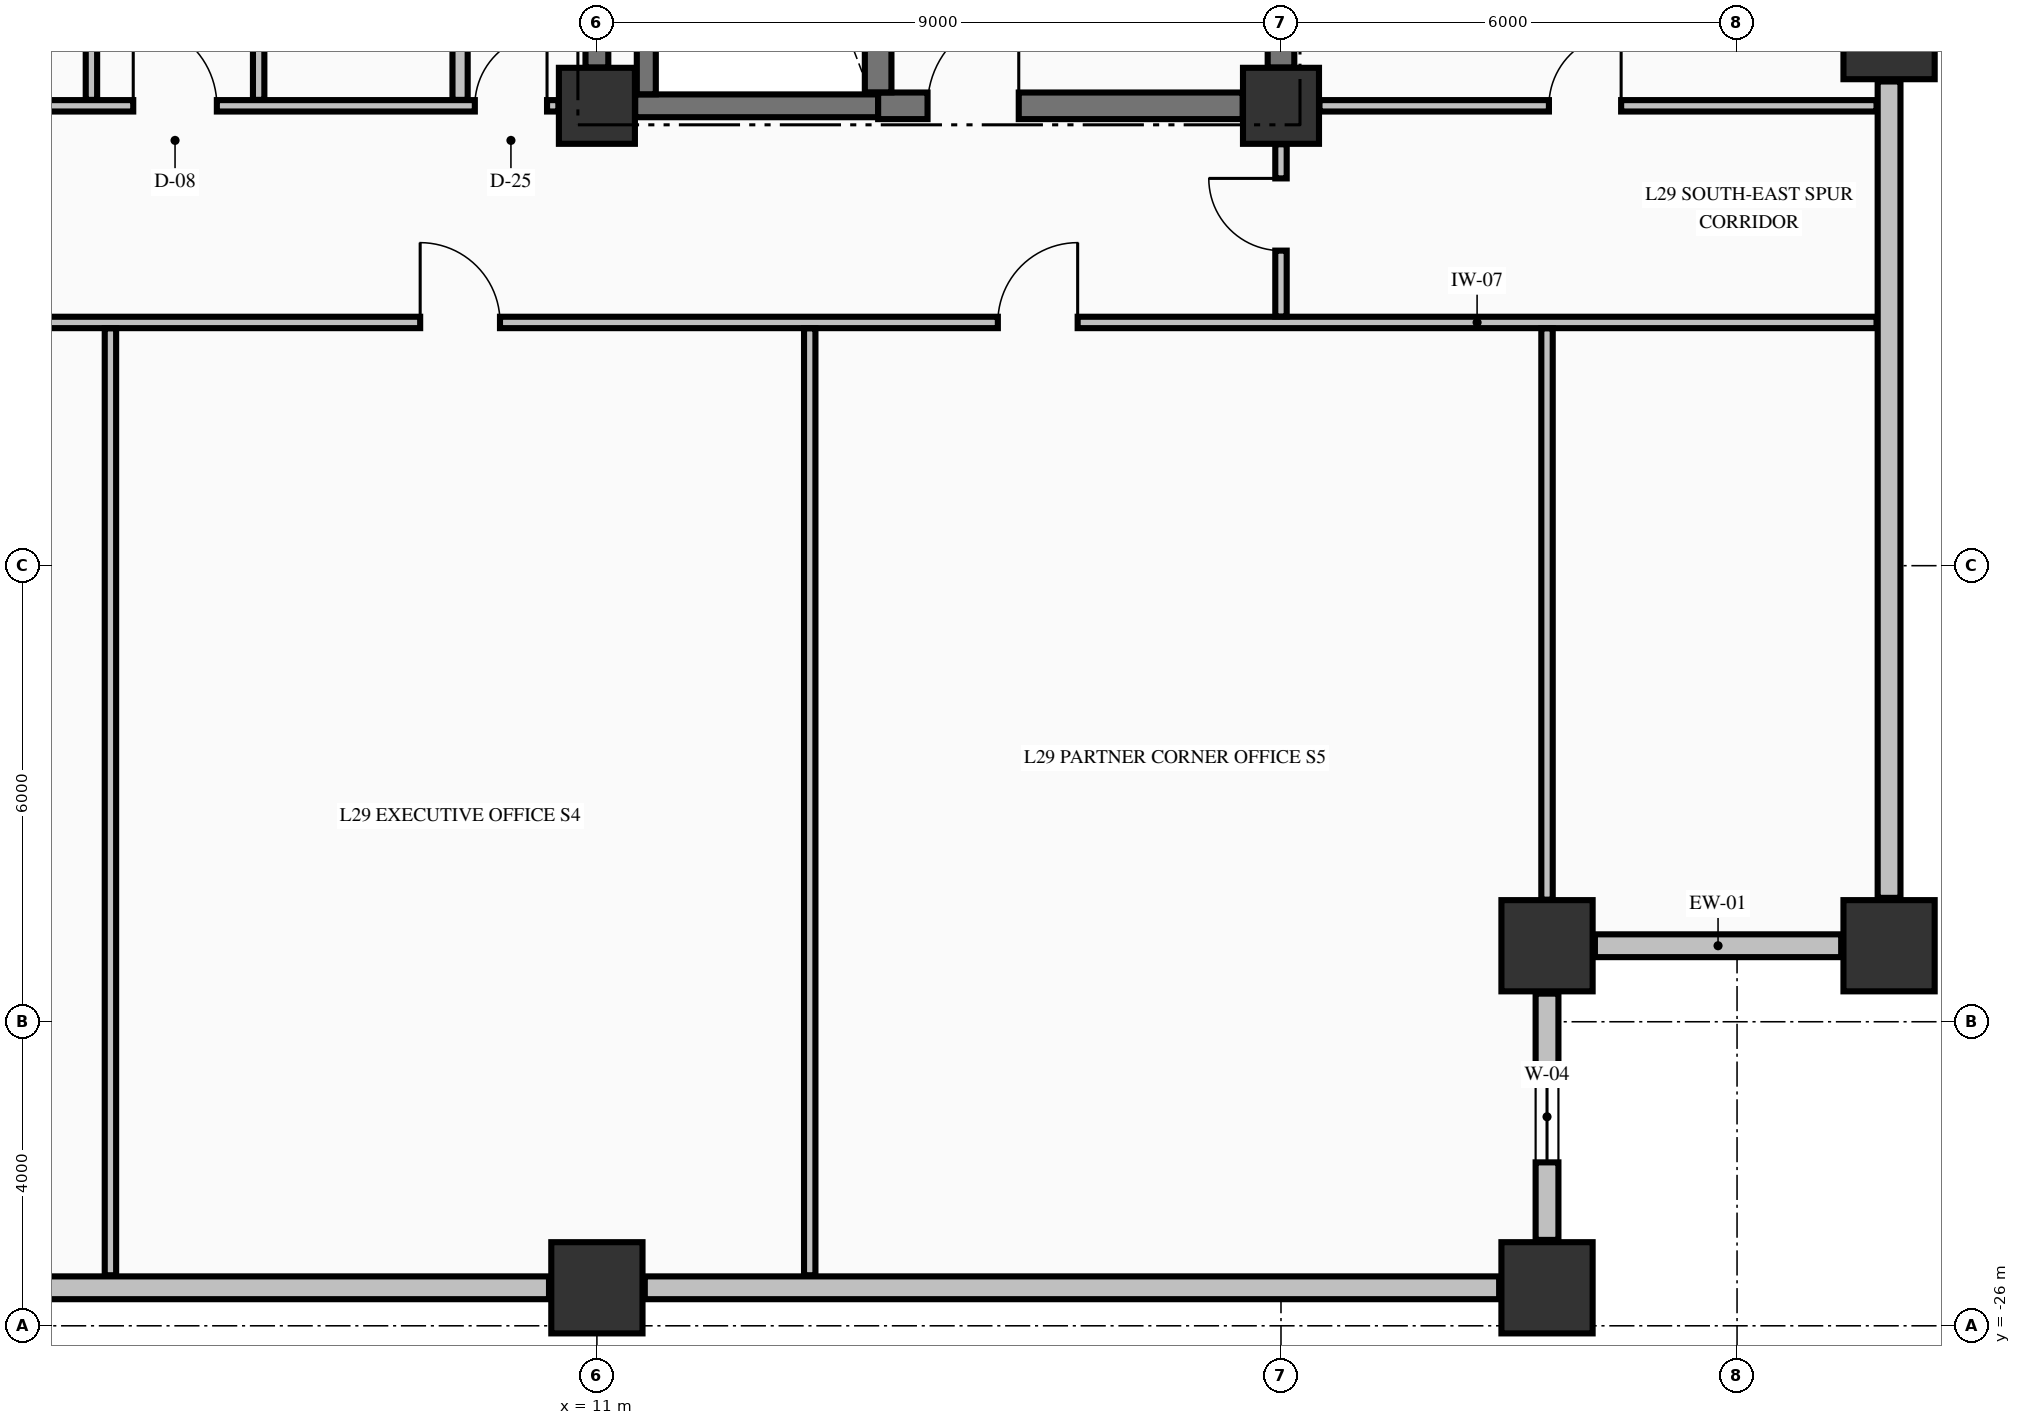
"""IFC4 building model, lengths in metres.
Left out: names, types, materials, properties, quantities, classifications, styles, units other than length and angle.
Written with IfcOpenShell. Run it as: python <this file> out.ifc"""

import sys

from ifc_helpers import new_model, si_unit, direction, frame, frame_2d, origin, origin_2d, place, context, subcontext, project, spatial, rectangle, extrude, element, fill, save


model = new_model("IFC4")
c1 = context("Model", 3, precision=1e-05, world=origin(), true_north=direction((0.0, 1.0)))
c2 = subcontext(c1, "Body", "Model", "MODEL_VIEW")
j1 = project(units=[si_unit("LENGTHUNIT", "METRE"), si_unit("PLANEANGLEUNIT", "RADIAN")], contexts=[c1])
p1 = place(None, origin())
s1 = spatial("IfcSite", under=j1, at=p1, CompositionType="ELEMENT")
p2 = place(p1, origin())
s2 = spatial("IfcBuilding", under=s1, at=p2, CompositionType="ELEMENT")
p3 = place(p2, frame((0.0, 0.0, 116.35)))
s3 = spatial("IfcBuildingStorey", under=s2, at=p3, CompositionType="ELEMENT", Elevation=116.35)
for number, where, z_axis, x_axis in (
    (1, (11.0, -25.5, -0.425), (0.0, 0.0, 1.0), (1.0, 0.0, 0.0)),
    (2, (23.5, -25.5, -0.425), (0.0, 0.0, 1.0), (1.0, 0.0, 0.0)),
    (3, (28.0, -21.0, -0.425), (0.0, 0.0, 1.0), (1.0, 0.0, 0.0)),
    (4, (28.0, -9.0, -0.425), (0.0, 0.0, 1.0), (1.0, 0.0, 0.0)),
    (5, (23.5, -21.0, -0.425), (0.0, 0.0, 1.0), (1.0, 0.0, 0.0)),
):
    element("IfcColumn", number, at=place(p3, frame(where, z_axis=z_axis, x_axis=x_axis)), inside=s3, PredefinedType="COLUMN", context=c2, shape_type="SweptSolid", body=[
        extrude(rectangle(XDim=1.2, YDim=1.2, at=origin_2d()), origin(), (0.0, 0.0, 1.0), 5.0),
    ])
for number, where, z_axis, x_axis in (
    (6, (11.0, -9.95, -0.425), (0.0, 0.0, 1.0), (1.0, 0.0, 0.0)),
    (7, (20.0, -9.95, -0.425), (0.0, 0.0, 1.0), (1.0, 0.0, 0.0)),
):
    element("IfcColumn", number, at=place(p3, frame(where, z_axis=z_axis, x_axis=x_axis)), inside=s3, PredefinedType="COLUMN", context=c2, shape_type="SweptSolid", body=[
        extrude(rectangle(XDim=1.0, YDim=1.0, at=origin_2d()), origin(), (0.0, 0.0, 1.0), 5.0),
    ])
p4 = place(p3, frame((23.5, -24.87, 0.0), z_axis=(0.0, 0.0, 1.0), x_axis=(0.0, 1.0, 0.0)))
e8 = element("IfcWall", 8, at=p4, inside=s3, PredefinedType="STANDARD", context=c2, shape_type="SweptSolid", body=[
    extrude(rectangle(XDim=3.24, YDim=0.3, at=frame_2d((1.62, 0.0))), origin(), (0.0, 0.0, 1.0), 2.767),
])
p5 = place(p4, frame((1.02, 0.0, 0.82)))
e9 = element("IfcOpeningElement", 9, at=p5, cuts=e8, PredefinedType="OPENING", context=c2, shape_type="SweptSolid", body=[
    extrude(rectangle(XDim=1.2, YDim=1.65, at=frame_2d((0.6, 0.825))), frame((0.0, 0.16, 0.0), z_axis=(0.0, -1.0, 0.0), x_axis=(1.0, 0.0, 0.0)), (0.0, 0.0, 1.0), 0.32),
])
p6 = place(p3, frame((24.13, -21.0, 0.0), z_axis=(0.0, 0.0, 1.0), x_axis=(1.0, 0.0, 0.0)))
e10 = element("IfcWall", 10, at=p6, inside=s3, PredefinedType="STANDARD", context=c2, shape_type="SweptSolid", body=[
    extrude(rectangle(XDim=3.24, YDim=0.3, at=frame_2d((1.62, 0.0))), origin(), (0.0, 0.0, 1.0), 2.167),
])
p7 = place(p3, frame((0.63, -25.5, 0.0), z_axis=(0.0, 0.0, 1.0), x_axis=(1.0, 0.0, 0.0)))
e11 = element("IfcWall", 11, at=p7, inside=s3, PredefinedType="STANDARD", context=c2, shape_type="SweptSolid", body=[
    extrude(rectangle(XDim=9.74, YDim=0.3, at=frame_2d((4.87, 0.0))), origin(), (0.0, 0.0, 1.0), 2.167),
])
p8 = place(p3, frame((11.63, -25.5, 0.0), z_axis=(0.0, 0.0, 1.0), x_axis=(1.0, 0.0, 0.0)))
e12 = element("IfcWall", 12, at=p8, inside=s3, PredefinedType="STANDARD", context=c2, shape_type="SweptSolid", body=[
    extrude(rectangle(XDim=11.24, YDim=0.3, at=frame_2d((5.62, 0.0))), origin(), (0.0, 0.0, 1.0), 2.167),
])
p9 = place(p3, frame((28.0, -20.37, 0.0), z_axis=(0.0, 0.0, 1.0), x_axis=(0.0, 1.0, 0.0)))
e13 = element("IfcWall", 13, at=p9, inside=s3, PredefinedType="STANDARD", context=c2, shape_type="SweptSolid", body=[
    extrude(rectangle(XDim=10.74, YDim=0.3, at=frame_2d((5.37, 0.0))), origin(), (0.0, 0.0, 1.0), 2.167),
])
p10 = place(p3, frame((11.504, -9.95, 0.0), z_axis=(0.0, 0.0, 1.0), x_axis=(1.0, 0.0, 0.0)))
e14 = element("IfcWall", 14, at=p10, inside=s3, PredefinedType="SHEAR", context=c2, shape_type="SweptSolid", body=[
    extrude(rectangle(XDim=3.196, YDim=0.3, at=frame_2d((1.598, 0.0))), origin(), (0.0, 0.0, 1.0), 4.575),
])
p11 = place(p3, frame((14.7, -9.95, 0.0), z_axis=(0.0, 0.0, 1.0), x_axis=(1.0, 0.0, 0.0)))
e15 = element("IfcWall", 15, at=p11, inside=s3, PredefinedType="SHEAR", context=c2, shape_type="SweptSolid", body=[
    extrude(rectangle(XDim=4.796, YDim=0.35, at=frame_2d((2.398, 0.0))), origin(), (0.0, 0.0, 1.0), 4.575),
])
p12 = place(p11, frame((0.65, 0.0, 0.0)))
e16 = element("IfcOpeningElement", 16, at=p12, cuts=e15, PredefinedType="OPENING", context=c2, shape_type="SweptSolid", body=[
    extrude(rectangle(XDim=1.2, YDim=2.15, at=frame_2d((0.6, 1.075))), frame((0.0, 0.185, 0.0), z_axis=(0.0, -1.0, 0.0), x_axis=(1.0, 0.0, 0.0)), (0.0, 0.0, 1.0), 0.37),
])
p13 = place(p3, frame((-22.835, -12.8, 0.0), z_axis=(0.0, 0.0, 1.0), x_axis=(1.0, 0.0, 0.0)))
e17 = element("IfcWall", 17, at=p13, inside=s3, PredefinedType="PARTITIONING", context=c2, shape_type="SweptSolid", body=[
    extrude(rectangle(XDim=50.67, YDim=0.15, at=frame_2d((25.335, 0.0))), origin(), (0.0, 0.0, 1.0), 4.575),
])
p14 = place(p13, frame((9.46, 0.0, 0.0)))
e18 = element("IfcOpeningElement", 18, at=p14, cuts=e17, PredefinedType="OPENING", context=c2, shape_type="SweptSolid", body=[
    extrude(rectangle(XDim=1.05, YDim=2.15, at=frame_2d((0.525, 1.075))), frame((0.0, 0.085, 0.0), z_axis=(0.0, -1.0, 0.0), x_axis=(1.0, 0.0, 0.0)), (0.0, 0.0, 1.0), 0.17),
])
p15 = place(p13, frame((17.86, 0.0, 0.0)))
e19 = element("IfcOpeningElement", 19, at=p15, cuts=e17, PredefinedType="OPENING", context=c2, shape_type="SweptSolid", body=[
    extrude(rectangle(XDim=0.95, YDim=2.15, at=frame_2d((0.475, 1.075))), frame((0.0, 0.085, 0.0), z_axis=(0.0, -1.0, 0.0), x_axis=(1.0, 0.0, 0.0)), (0.0, 0.0, 1.0), 0.17),
])
p16 = place(p13, frame((22.21, 0.0, 0.0)))
e20 = element("IfcOpeningElement", 20, at=p16, cuts=e17, PredefinedType="OPENING", context=c2, shape_type="SweptSolid", body=[
    extrude(rectangle(XDim=0.95, YDim=2.02, at=frame_2d((0.475, 1.01))), frame((0.0, 0.085, 0.0), z_axis=(0.0, -1.0, 0.0), x_axis=(1.0, 0.0, 0.0)), (0.0, 0.0, 1.0), 0.17),
])
p17 = place(p13, frame((31.51, 0.0, 0.0)))
e21 = element("IfcOpeningElement", 21, at=p17, cuts=e17, PredefinedType="OPENING", context=c2, shape_type="SweptSolid", body=[
    extrude(rectangle(XDim=1.05, YDim=2.15, at=frame_2d((0.525, 1.075))), frame((0.0, 0.085, 0.0), z_axis=(0.0, -1.0, 0.0), x_axis=(1.0, 0.0, 0.0)), (0.0, 0.0, 1.0), 0.17),
])
p18 = place(p13, frame((39.11, 0.0, 0.0)))
e22 = element("IfcOpeningElement", 22, at=p18, cuts=e17, PredefinedType="OPENING", context=c2, shape_type="SweptSolid", body=[
    extrude(rectangle(XDim=1.05, YDim=2.15, at=frame_2d((0.525, 1.075))), frame((0.0, 0.085, 0.0), z_axis=(0.0, -1.0, 0.0), x_axis=(1.0, 0.0, 0.0)), (0.0, 0.0, 1.0), 0.17),
])
p19 = place(p3, frame((-10.494, -9.95, 0.0), z_axis=(0.0, 0.0, 1.0), x_axis=(1.0, 0.0, 0.0)))
e23 = element("IfcWall", 23, at=p19, inside=s3, PredefinedType="PARTITIONING", context=c2, shape_type="SweptSolid", body=[
    extrude(rectangle(XDim=20.988, YDim=0.15, at=frame_2d((10.494, 0.0))), origin(), (0.0, 0.0, 1.0), 4.575),
])
p20 = place(p19, frame((15.394, 0.0, 0.0)))
e24 = element("IfcOpeningElement", 24, at=p20, cuts=e23, PredefinedType="OPENING", context=c2, shape_type="SweptSolid", body=[
    extrude(rectangle(XDim=1.1, YDim=2.15, at=frame_2d((0.55, 1.075))), frame((0.0, 0.085, 0.0), z_axis=(0.0, -1.0, 0.0), x_axis=(1.0, 0.0, 0.0)), (0.0, 0.0, 1.0), 0.17),
])
p21 = place(p19, frame((19.888, 0.0, 0.0)))
e25 = element("IfcOpeningElement", 25, at=p21, cuts=e23, PredefinedType="OPENING", context=c2, shape_type="SweptSolid", body=[
    extrude(rectangle(XDim=0.95, YDim=2.02, at=frame_2d((0.475, 1.01))), frame((0.0, 0.085, 0.0), z_axis=(0.0, -1.0, 0.0), x_axis=(1.0, 0.0, 0.0)), (0.0, 0.0, 1.0), 0.17),
])
p22 = place(p3, frame((20.506, -9.95, 0.0), z_axis=(0.0, 0.0, 1.0), x_axis=(1.0, 0.0, 0.0)))
e26 = element("IfcWall", 26, at=p22, inside=s3, PredefinedType="PARTITIONING", context=c2, shape_type="SweptSolid", body=[
    extrude(rectangle(XDim=7.329, YDim=0.15, at=frame_2d((3.665, 0.0))), origin(), (0.0, 0.0, 1.0), 4.575),
])
p23 = place(p22, frame((3.019, 0.0, 0.0)))
e27 = element("IfcOpeningElement", 27, at=p23, cuts=e26, PredefinedType="OPENING", context=c2, shape_type="SweptSolid", body=[
    extrude(rectangle(XDim=0.95, YDim=2.02, at=frame_2d((0.475, 1.01))), frame((0.0, 0.085, 0.0), z_axis=(0.0, -1.0, 0.0), x_axis=(1.0, 0.0, 0.0)), (0.0, 0.0, 1.0), 0.17),
])
p24 = place(p3, frame((11.0, -9.446, 0.0), z_axis=(0.0, 0.0, 1.0), x_axis=(0.0, 1.0, 0.0)))
e28 = element("IfcWall", 28, at=p24, inside=s3, PredefinedType="SHEAR", context=c2, shape_type="SweptSolid", body=[
    extrude(rectangle(XDim=8.942, YDim=0.3, at=frame_2d((4.471, 0.0))), origin(), (0.0, 0.0, 1.0), 4.575),
])
p25 = place(p3, frame((11.65, -9.798, 0.0), z_axis=(0.0, 0.0, 1.0), x_axis=(0.0, 1.0, 0.0)))
e29 = element("IfcWall", 29, at=p25, inside=s3, PredefinedType="SOLIDWALL", context=c2, shape_type="SweptSolid", body=[
    extrude(rectangle(XDim=9.396, YDim=0.25, at=frame_2d((4.698, 0.0))), origin(), (0.0, 0.0, 1.0), 4.575),
])
p26 = place(p3, frame((14.7, -9.773, 0.0), z_axis=(0.0, 0.0, 1.0), x_axis=(0.0, 1.0, 0.0)))
e30 = element("IfcWall", 30, at=p26, inside=s3, PredefinedType="SHEAR", context=c2, shape_type="SweptSolid", body=[
    extrude(rectangle(XDim=9.371, YDim=0.35, at=frame_2d((4.686, 0.0))), origin(), (0.0, 0.0, 1.0), 4.575),
])
p27 = place(p3, frame((20.0, -9.446, 0.0), z_axis=(0.0, 0.0, 1.0), x_axis=(0.0, 1.0, 0.0)))
e31 = element("IfcWall", 31, at=p27, inside=s3, PredefinedType="SHEAR", context=c2, shape_type="SweptSolid", body=[
    extrude(rectangle(XDim=2.269, YDim=0.35, at=frame_2d((1.135, 0.0))), origin(), (0.0, 0.0, 1.0), 4.575),
])
p28 = place(p3, frame((4.35, -9.872, 0.0), z_axis=(0.0, 0.0, 1.0), x_axis=(0.0, 1.0, 0.0)))
e32 = element("IfcWall", 32, at=p28, inside=s3, PredefinedType="PARTITIONING", context=c2, shape_type="SweptSolid", body=[
    extrude(rectangle(XDim=9.544, YDim=0.15, at=frame_2d((4.772, 0.0))), origin(), (0.0, 0.0, 1.0), 4.575),
])
p29 = place(p3, frame((4.6, -25.335, 0.0), z_axis=(0.0, 0.0, 1.0), x_axis=(0.0, 1.0, 0.0)))
e33 = element("IfcWall", 33, at=p29, inside=s3, PredefinedType="PARTITIONING", context=c2, shape_type="SweptSolid", body=[
    extrude(rectangle(XDim=12.457, YDim=0.15, at=frame_2d((6.229, 0.0))), origin(), (0.0, 0.0, 1.0), 4.575),
])
p30 = place(p3, frame((6.55, -9.872, 0.0), z_axis=(0.0, 0.0, 1.0), x_axis=(0.0, 1.0, 0.0)))
e34 = element("IfcWall", 34, at=p30, inside=s3, PredefinedType="PARTITIONING", context=c2, shape_type="SweptSolid", body=[
    extrude(rectangle(XDim=4.419, YDim=0.15, at=frame_2d((2.209, 0.0))), origin(), (0.0, 0.0, 1.0), 4.575),
])
p31 = place(p30, frame((1.997, 0.0, 0.0)))
e35 = element("IfcOpeningElement", 35, at=p31, cuts=e34, PredefinedType="OPENING", context=c2, shape_type="SweptSolid", body=[
    extrude(rectangle(XDim=0.95, YDim=2.15, at=frame_2d((0.475, 1.075))), frame((0.0, 0.085, 0.0), z_axis=(0.0, -1.0, 0.0), x_axis=(1.0, 0.0, 0.0)), (0.0, 0.0, 1.0), 0.17),
])
p32 = place(p3, frame((9.2, -9.872, 0.0), z_axis=(0.0, 0.0, 1.0), x_axis=(0.0, 1.0, 0.0)))
e36 = element("IfcWall", 36, at=p32, inside=s3, PredefinedType="PARTITIONING", context=c2, shape_type="SweptSolid", body=[
    extrude(rectangle(XDim=4.419, YDim=0.2, at=frame_2d((2.209, 0.0))), origin(), (0.0, 0.0, 1.0), 4.575),
])
p33 = place(p3, frame((13.8, -25.335, 0.0), z_axis=(0.0, 0.0, 1.0), x_axis=(0.0, 1.0, 0.0)))
e37 = element("IfcWall", 37, at=p33, inside=s3, PredefinedType="PARTITIONING", context=c2, shape_type="SweptSolid", body=[
    extrude(rectangle(XDim=12.457, YDim=0.15, at=frame_2d((6.229, 0.0))), origin(), (0.0, 0.0, 1.0), 4.575),
])
p34 = place(p3, frame((20.0, -12.722, 0.0), z_axis=(0.0, 0.0, 1.0), x_axis=(0.0, 1.0, 0.0)))
e38 = element("IfcWall", 38, at=p34, inside=s3, PredefinedType="PARTITIONING", context=c2, shape_type="SweptSolid", body=[
    extrude(rectangle(XDim=2.266, YDim=0.15, at=frame_2d((1.133, 0.0))), origin(), (0.0, 0.0, 1.0), 4.03),
])
p35 = place(p34, frame((0.867, 0.0, 0.0)))
e39 = element("IfcOpeningElement", 39, at=p35, cuts=e38, PredefinedType="OPENING", context=c2, shape_type="SweptSolid", body=[
    extrude(rectangle(XDim=0.95, YDim=2.02, at=frame_2d((0.475, 1.01))), frame((0.0, 0.085, 0.0), z_axis=(0.0, -1.0, 0.0), x_axis=(1.0, 0.0, 0.0)), (0.0, 0.0, 1.0), 0.17),
])
p36 = place(p3, frame((23.5, -20.394, 0.0), z_axis=(0.0, 0.0, 1.0), x_axis=(0.0, 1.0, 0.0)))
e40 = element("IfcWall", 40, at=p36, inside=s3, PredefinedType="PARTITIONING", context=c2, shape_type="SweptSolid", body=[
    extrude(rectangle(XDim=7.516, YDim=0.15, at=frame_2d((3.758, 0.0))), origin(), (0.0, 0.0, 1.0), 2.167),
])
p37 = place(p5, origin())
e41 = element("IfcWindow", 41, at=p37, inside=s3, PartitioningType="SINGLE_PANEL", PredefinedType="WINDOW", context=c2, shape_type="SweptSolid", body=[
    extrude(rectangle(XDim=1.2, YDim=1.65, at=frame_2d((0.6, 0.825))), frame((0.0, 0.03, 0.0), z_axis=(0.0, -1.0, 0.0), x_axis=(1.0, 0.0, 0.0)), (0.0, 0.0, 1.0), 0.06),
])
fill(e9, e41)
p38 = place(p12, origin())
e42 = element("IfcDoor", 42, at=p38, inside=s3, OperationType="SINGLE_SWING_RIGHT", PredefinedType="DOOR", context=c2, shape_type="SweptSolid", body=[
    extrude(rectangle(XDim=1.2, YDim=2.15, at=frame_2d((0.6, 1.075))), frame((0.0, 0.025, 0.0), z_axis=(0.0, -1.0, 0.0), x_axis=(1.0, 0.0, 0.0)), (0.0, 0.0, 1.0), 0.05),
])
fill(e16, e42)
p39 = place(p20, origin())
e43 = element("IfcDoor", 43, at=p39, inside=s3, OperationType="SINGLE_SWING_LEFT", PredefinedType="DOOR", context=c2, shape_type="SweptSolid", body=[
    extrude(rectangle(XDim=1.1, YDim=2.15, at=frame_2d((0.55, 1.075))), frame((0.0, 0.025, 0.0), z_axis=(0.0, -1.0, 0.0), x_axis=(1.0, 0.0, 0.0)), (0.0, 0.0, 1.0), 0.05),
])
fill(e24, e43)
p40 = place(p17, origin())
e44 = element("IfcDoor", 44, at=p40, inside=s3, OperationType="SINGLE_SWING_LEFT", PredefinedType="DOOR", context=c2, shape_type="SweptSolid", body=[
    extrude(rectangle(XDim=1.05, YDim=2.15, at=frame_2d((0.525, 1.075))), frame((0.0, 0.025, 0.0), z_axis=(0.0, -1.0, 0.0), x_axis=(1.0, 0.0, 0.0)), (0.0, 0.0, 1.0), 0.05),
])
fill(e21, e44)
p41 = place(p18, origin())
e45 = element("IfcDoor", 45, at=p41, inside=s3, OperationType="SINGLE_SWING_RIGHT", PredefinedType="DOOR", context=c2, shape_type="SweptSolid", body=[
    extrude(rectangle(XDim=1.05, YDim=2.15, at=frame_2d((0.525, 1.075))), frame((0.0, 0.025, 0.0), z_axis=(0.0, -1.0, 0.0), x_axis=(1.0, 0.0, 0.0)), (0.0, 0.0, 1.0), 0.05),
])
fill(e22, e45)
p42 = place(p21, origin())
e46 = element("IfcDoor", 46, at=p42, inside=s3, OperationType="SINGLE_SWING_RIGHT", PredefinedType="DOOR", context=c2, shape_type="SweptSolid", body=[
    extrude(rectangle(XDim=0.95, YDim=2.02, at=frame_2d((0.475, 1.01))), frame((0.0, 0.025, 0.0), z_axis=(0.0, -1.0, 0.0), x_axis=(1.0, 0.0, 0.0)), (0.0, 0.0, 1.0), 0.05),
])
fill(e25, e46)
p43 = place(p35, origin())
e47 = element("IfcDoor", 47, at=p43, inside=s3, OperationType="SINGLE_SWING_RIGHT", PredefinedType="DOOR", context=c2, shape_type="SweptSolid", body=[
    extrude(rectangle(XDim=0.95, YDim=2.02, at=frame_2d((0.475, 1.01))), frame((0.0, 0.025, 0.0), z_axis=(0.0, -1.0, 0.0), x_axis=(1.0, 0.0, 0.0)), (0.0, 0.0, 1.0), 0.05),
])
fill(e39, e47)
p44 = place(p23, origin())
e48 = element("IfcDoor", 48, at=p44, inside=s3, OperationType="SINGLE_SWING_RIGHT", PredefinedType="DOOR", context=c2, shape_type="SweptSolid", body=[
    extrude(rectangle(XDim=0.95, YDim=2.02, at=frame_2d((0.475, 1.01))), frame((0.0, 0.025, 0.0), z_axis=(0.0, -1.0, 0.0), x_axis=(1.0, 0.0, 0.0)), (0.0, 0.0, 1.0), 0.05),
])
fill(e27, e48)
save(model, sys.argv[1])
